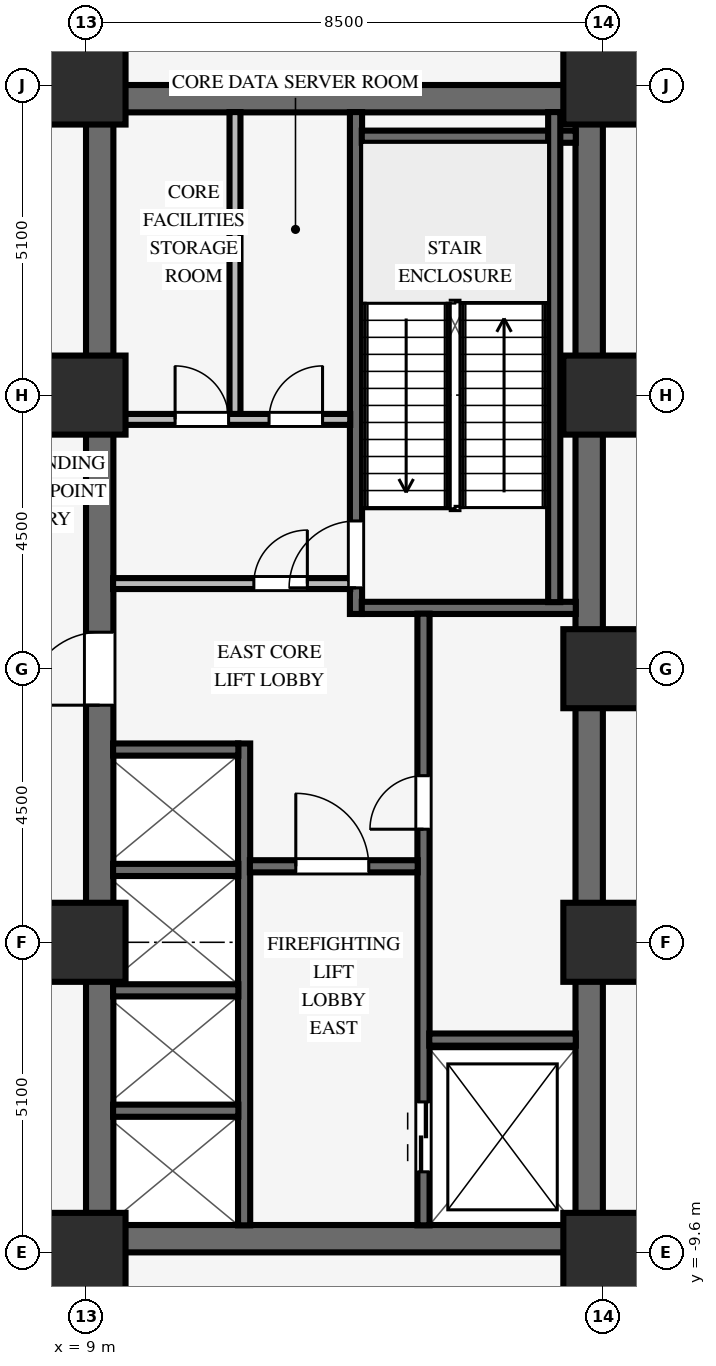
"""IFC4 building model, lengths in metres.
Left out: names, types, materials, properties, quantities, classifications, styles, units other than length and angle.
Written with IfcOpenShell. Run it as: python <this file> out.ifc"""

import sys

from ifc_helpers import new_model, si_unit, direction, frame, frame_2d, origin, origin_2d, place, context, subcontext, project, spatial, rectangle, extrude, source, transform, mapped, element, fill, save


model = new_model("IFC4")
c1 = context("Model", 3, precision=1e-05, world=origin(), true_north=direction((0.0, 1.0)))
c2 = subcontext(c1, "Body", "Model", "MODEL_VIEW")
j1 = project(units=[si_unit("LENGTHUNIT", "METRE"), si_unit("PLANEANGLEUNIT", "RADIAN")], contexts=[c1])
p1 = place(None, origin())
s1 = spatial("IfcSite", under=j1, at=p1, CompositionType="ELEMENT")
p2 = place(p1, origin())
s2 = spatial("IfcBuilding", under=s1, at=p2, CompositionType="ELEMENT")
p3 = place(p2, frame((0.0, 0.0, 18.4)))
s3 = spatial("IfcBuildingStorey", under=s2, at=p3, CompositionType="ELEMENT", Elevation=18.4)
for number, where, z_axis, x_axis in (
    (1, (9.0, -9.375, 0.0), (0.0, 0.0, 1.0), (1.0, 0.0, 0.0)),
    (2, (9.0, 9.375, 0.0), (0.0, 0.0, 1.0), (1.0, 0.0, 0.0)),
):
    element("IfcWall", number, at=place(p3, frame(where, z_axis=z_axis, x_axis=x_axis)), inside=s3, PredefinedType="SHEAR", context=c2, shape_type="SweptSolid", body=[
        extrude(rectangle(XDim=8.5, YDim=0.45, at=frame_2d((4.25, 0.0))), origin(), (0.0, 0.0, 1.0), 4.2),
    ])
p4 = place(p3, frame((9.225, -9.155, 0.0), z_axis=(0.0, 0.0, 1.0), x_axis=(0.0, 1.0, 0.0)))
e3 = element("IfcWall", 3, at=p4, inside=s3, PredefinedType="SHEAR", context=c2, shape_type="SweptSolid", body=[
    extrude(rectangle(XDim=18.31, YDim=0.45, at=frame_2d((9.155, 0.0))), origin(), (0.0, 0.0, 1.0), 4.2),
])
p5 = place(p4, frame((8.555, 0.0, 0.0)))
e4 = element("IfcOpeningElement", 4, at=p5, cuts=e3, PredefinedType="OPENING", context=c2, shape_type="SweptSolid", body=[
    extrude(rectangle(XDim=1.2, YDim=2.15, at=frame_2d((0.6, 1.075))), frame((0.0, 0.235, 0.0), z_axis=(0.0, -1.0, 0.0), x_axis=(1.0, 0.0, 0.0)), (0.0, 0.0, 1.0), 0.47),
])
p6 = place(p3, frame((17.275, -9.155, 0.0), z_axis=(0.0, 0.0, 1.0), x_axis=(0.0, 1.0, 0.0)))
e5 = element("IfcWall", 5, at=p6, inside=s3, PredefinedType="SHEAR", context=c2, shape_type="SweptSolid", body=[
    extrude(rectangle(XDim=18.31, YDim=0.45, at=frame_2d((9.155, 0.0))), origin(), (0.0, 0.0, 1.0), 4.2),
])
for number, where, z_axis, x_axis in (
    (6, (9.0, -9.6, 0.0), (0.0, 0.0, 1.0), (1.0, 0.0, 0.0)),
    (7, (9.0, -4.5, 0.0), (0.0, 0.0, 1.0), (1.0, 0.0, 0.0)),
    (8, (9.0, 4.5, 0.0), (0.0, 0.0, 1.0), (1.0, 0.0, 0.0)),
    (9, (9.0, 9.6, 0.0), (0.0, 0.0, 1.0), (1.0, 0.0, 0.0)),
    (10, (17.5, -9.6, 0.0), (0.0, 0.0, 1.0), (1.0, 0.0, 0.0)),
    (11, (17.5, -4.5, 0.0), (0.0, 0.0, 1.0), (1.0, 0.0, 0.0)),
    (12, (17.5, 4.5, 0.0), (0.0, 0.0, 1.0), (1.0, 0.0, 0.0)),
    (13, (17.5, 9.6, 0.0), (0.0, 0.0, 1.0), (1.0, 0.0, 0.0)),
    (14, (17.5, 0.0, 0.0), (0.0, 0.0, 1.0), (1.0, 0.0, 0.0)),
):
    element("IfcColumn", number, at=place(p3, frame(where, z_axis=z_axis, x_axis=x_axis)), inside=s3, PredefinedType="COLUMN", context=c2, shape_type="SweptSolid", body=[
        extrude(rectangle(XDim=1.3, YDim=1.3, at=origin_2d()), origin(), (0.0, 0.0, 1.0), 4.2),
    ])
p7 = place(p3, frame((13.44, 0.9, 0.0), z_axis=(0.0, 0.0, 1.0), x_axis=(0.0, 1.0, 0.0)))
e15 = element("IfcWall", 15, at=p7, inside=s3, PredefinedType="SHEAR", context=c2, shape_type="SweptSolid", body=[
    extrude(rectangle(XDim=8.255, YDim=0.2, at=frame_2d((4.127, 0.0))), origin(), (0.0, 0.0, 1.0), 4.2),
])
p8 = place(p7, frame((0.43, 0.0, 0.0)))
e16 = element("IfcOpeningElement", 16, at=p8, cuts=e15, PredefinedType="OPENING", context=c2, shape_type="SweptSolid", body=[
    extrude(rectangle(XDim=1.1, YDim=2.15, at=frame_2d((0.55, 1.075))), frame((0.0, 0.11, 0.0), z_axis=(0.0, -1.0, 0.0), x_axis=(1.0, 0.0, 0.0)), (0.0, 0.0, 1.0), 0.22),
])
for number, where, z_axis, x_axis in (
    (17, (13.535, 1.0, 0.0), (0.0, 0.0, 1.0), (1.0, 0.0, 0.0)),
    (18, (13.535, 8.75, 0.0), (0.0, 0.0, 1.0), (1.0, 0.0, 0.0)),
):
    element("IfcWall", number, at=place(p3, frame(where, z_axis=z_axis, x_axis=x_axis)), inside=s3, PredefinedType="SHEAR", context=c2, shape_type="SweptSolid", body=[
        extrude(rectangle(XDim=3.52, YDim=0.2, at=frame_2d((1.76, 0.0))), origin(), (0.0, 0.0, 1.0), 4.2),
    ])
p9 = place(p3, frame((16.7, 1.095, 0.0), z_axis=(0.0, 0.0, 1.0), x_axis=(0.0, 1.0, 0.0)))
e19 = element("IfcWall", 19, at=p9, inside=s3, PredefinedType="SHEAR", context=c2, shape_type="SweptSolid", body=[
    extrude(rectangle(XDim=8.06, YDim=0.2, at=frame_2d((4.03, 0.0))), origin(), (0.0, 0.0, 1.0), 4.2),
])
p10 = place(p3, frame((14.55, -9.155, 0.0), z_axis=(0.0, 0.0, 1.0), x_axis=(0.0, 1.0, 0.0)))
e20 = element("IfcWall", 20, at=p10, inside=s3, PredefinedType="SHEAR", context=c2, shape_type="SweptSolid", body=[
    extrude(rectangle(XDim=10.06, YDim=0.2, at=frame_2d((5.03, 0.0))), origin(), (0.0, 0.0, 1.0), 4.2),
])
p11 = place(p10, frame((6.515, 0.0, 0.0)))
e21 = element("IfcOpeningElement", 21, at=p11, cuts=e20, PredefinedType="OPENING", context=c2, shape_type="SweptSolid", body=[
    extrude(rectangle(XDim=0.88, YDim=2.1, at=frame_2d((0.44, 1.05))), frame((0.0, 0.11, 0.0), z_axis=(0.0, -1.0, 0.0), x_axis=(1.0, 0.0, 0.0)), (0.0, 0.0, 1.0), 0.22),
])
p12 = place(p10, frame((0.88, 0.0, 0.0)))
e22 = element("IfcOpeningElement", 22, at=p12, cuts=e20, PredefinedType="OPENING", context=c2, shape_type="SweptSolid", body=[
    extrude(rectangle(XDim=1.15, YDim=2.15, at=frame_2d((0.575, 1.075))), frame((0.0, 0.11, 0.0), z_axis=(0.0, -1.0, 0.0), x_axis=(1.0, 0.0, 0.0)), (0.0, 0.0, 1.0), 0.22),
])
p13 = place(p3, frame((14.645, -6.1, 0.0), z_axis=(0.0, 0.0, 1.0), x_axis=(1.0, 0.0, 0.0)))
e23 = element("IfcWall", 23, at=p13, inside=s3, PredefinedType="SHEAR", context=c2, shape_type="SweptSolid", body=[
    extrude(rectangle(XDim=2.41, YDim=0.2, at=frame_2d((1.205, 0.0))), origin(), (0.0, 0.0, 1.0), 4.2),
])
p14 = place(p3, frame((11.6, -9.155, 0.0), z_axis=(0.0, 0.0, 1.0), x_axis=(0.0, 1.0, 0.0)))
e24 = element("IfcWall", 24, at=p14, inside=s3, PredefinedType="SHEAR", context=c2, shape_type="SweptSolid", body=[
    extrude(rectangle(XDim=7.925, YDim=0.2, at=frame_2d((3.962, 0.0))), origin(), (0.0, 0.0, 1.0), 4.2),
])
p15 = place(p3, frame((11.695, -3.25, 0.0), z_axis=(0.0, 0.0, 1.0), x_axis=(1.0, 0.0, 0.0)))
e25 = element("IfcWall", 25, at=p15, inside=s3, PredefinedType="SHEAR", context=c2, shape_type="SweptSolid", body=[
    extrude(rectangle(XDim=2.76, YDim=0.2, at=frame_2d((1.38, 0.0))), origin(), (0.0, 0.0, 1.0), 4.2),
])
p16 = place(p15, frame((0.755, 0.0, 0.0)))
e26 = element("IfcOpeningElement", 26, at=p16, cuts=e25, PredefinedType="OPENING", context=c2, shape_type="SweptSolid", body=[
    extrude(rectangle(XDim=1.2, YDim=2.15, at=frame_2d((0.6, 1.075))), frame((0.0, 0.11, 0.0), z_axis=(0.0, -1.0, 0.0), x_axis=(1.0, 0.0, 0.0)), (0.0, 0.0, 1.0), 0.22),
])
for number, where, z_axis, x_axis in (
    (27, (9.445, -7.27, 0.0), (0.0, 0.0, 1.0), (1.0, 0.0, 0.0)),
    (28, (9.445, -5.29, 0.0), (0.0, 0.0, 1.0), (1.0, 0.0, 0.0)),
    (29, (9.445, -3.31, 0.0), (0.0, 0.0, 1.0), (1.0, 0.0, 0.0)),
    (30, (9.445, -1.33, 0.0), (0.0, 0.0, 1.0), (1.0, 0.0, 0.0)),
):
    element("IfcWall", number, at=place(p3, frame(where, z_axis=z_axis, x_axis=x_axis)), inside=s3, PredefinedType="SHEAR", context=c2, shape_type="SweptSolid", body=[
        extrude(rectangle(XDim=2.06, YDim=0.2, at=frame_2d((1.03, 0.0))), origin(), (0.0, 0.0, 1.0), 4.2),
    ])
p17 = place(p3, frame((9.445, 1.4, 0.0), z_axis=(0.0, 0.0, 1.0), x_axis=(1.0, 0.0, 0.0)))
e31 = element("IfcWall", 31, at=p17, inside=s3, PredefinedType="PARTITIONING", context=c2, shape_type="SweptSolid", body=[
    extrude(rectangle(XDim=3.9, YDim=0.18, at=frame_2d((1.95, 0.0))), origin(), (0.0, 0.0, 1.0), 4.19),
])
p18 = place(p17, frame((2.315, 0.0, 0.0)))
e32 = element("IfcOpeningElement", 32, at=p18, cuts=e31, PredefinedType="OPENING", context=c2, shape_type="SweptSolid", body=[
    extrude(rectangle(XDim=0.88, YDim=2.1, at=frame_2d((0.44, 1.05))), frame((0.0, 0.1, 0.0), z_axis=(0.0, -1.0, 0.0), x_axis=(1.0, 0.0, 0.0)), (0.0, 0.0, 1.0), 0.2),
])
p19 = place(p3, frame((9.445, 4.1, 0.0), z_axis=(0.0, 0.0, 1.0), x_axis=(1.0, 0.0, 0.0)))
e33 = element("IfcWall", 33, at=p19, inside=s3, PredefinedType="PARTITIONING", context=c2, shape_type="SweptSolid", body=[
    extrude(rectangle(XDim=3.9, YDim=0.18, at=frame_2d((1.95, 0.0))), origin(), (0.0, 0.0, 1.0), 4.19),
])
p20 = place(p19, frame((1.02, 0.0, 0.0)))
e34 = element("IfcOpeningElement", 34, at=p20, cuts=e33, PredefinedType="OPENING", context=c2, shape_type="SweptSolid", body=[
    extrude(rectangle(XDim=0.88, YDim=2.1, at=frame_2d((0.44, 1.05))), frame((0.0, 0.1, 0.0), z_axis=(0.0, -1.0, 0.0), x_axis=(1.0, 0.0, 0.0)), (0.0, 0.0, 1.0), 0.2),
])
p21 = place(p19, frame((2.565, 0.0, 0.0)))
e35 = element("IfcOpeningElement", 35, at=p21, cuts=e33, PredefinedType="OPENING", context=c2, shape_type="SweptSolid", body=[
    extrude(rectangle(XDim=0.88, YDim=2.1, at=frame_2d((0.44, 1.05))), frame((0.0, 0.1, 0.0), z_axis=(0.0, -1.0, 0.0), x_axis=(1.0, 0.0, 0.0)), (0.0, 0.0, 1.0), 0.2),
])
p22 = place(p3, frame((11.45, 4.19, 0.0), z_axis=(0.0, 0.0, 1.0), x_axis=(0.0, 1.0, 0.0)))
e36 = element("IfcWall", 36, at=p22, inside=s3, PredefinedType="PARTITIONING", context=c2, shape_type="SweptSolid", body=[
    extrude(rectangle(XDim=4.965, YDim=0.18, at=frame_2d((2.482, 0.0))), origin(), (0.0, 0.0, 1.0), 4.19),
])
m1 = source(origin(), c2, "Body", "SweptSolid", [
    extrude(rectangle(XDim=1.1, YDim=2.15, at=frame_2d((0.55, 1.075))), frame((0.0, 0.025, 0.0), z_axis=(0.0, -1.0, 0.0), x_axis=(1.0, 0.0, 0.0)), (0.0, 0.0, 1.0), 0.05),
])
p23 = place(p8, origin())
e37 = element("IfcDoor", 37, at=p23, inside=s3, OperationType="SINGLE_SWING_LEFT", PredefinedType="DOOR", context=c2, shape_type="MappedRepresentation", body=[
    mapped(m1, transform((0.0, 0.0, 0.0), scale=1.0)),
])
fill(e16, e37)
m2 = source(origin(), c2, "Body", "SweptSolid", [
    extrude(rectangle(XDim=0.88, YDim=2.1, at=frame_2d((0.44, 1.05))), frame((0.0, 0.025, 0.0), z_axis=(0.0, -1.0, 0.0), x_axis=(1.0, 0.0, 0.0)), (0.0, 0.0, 1.0), 0.05),
])
p24 = place(p11, origin())
e38 = element("IfcDoor", 38, at=p24, inside=s3, OperationType="SINGLE_SWING_LEFT", PredefinedType="DOOR", context=c2, shape_type="MappedRepresentation", body=[
    mapped(m2, transform((0.0, 0.0, 0.0), scale=1.0)),
])
fill(e21, e38)
m3 = source(origin(), c2, "Body", "SweptSolid", [
    extrude(rectangle(XDim=1.2, YDim=2.15, at=frame_2d((0.6, 1.075))), frame((0.0, 0.025, 0.0), z_axis=(0.0, -1.0, 0.0), x_axis=(1.0, 0.0, 0.0)), (0.0, 0.0, 1.0), 0.05),
])
p25 = place(p16, origin())
e39 = element("IfcDoor", 39, at=p25, inside=s3, OperationType="SINGLE_SWING_LEFT", PredefinedType="DOOR", context=c2, shape_type="MappedRepresentation", body=[
    mapped(m3, transform((0.0, 0.0, 0.0), scale=1.0)),
])
fill(e26, e39)
p26 = place(p5, origin())
e40 = element("IfcDoor", 40, at=p26, inside=s3, OperationType="SINGLE_SWING_LEFT", PredefinedType="DOOR", context=c2, shape_type="MappedRepresentation", body=[
    mapped(m3, transform((0.0, 0.0, 0.0), scale=1.0)),
])
fill(e4, e40)
p27 = place(p18, origin())
e41 = element("IfcDoor", 41, at=p27, inside=s3, OperationType="SINGLE_SWING_RIGHT", PredefinedType="DOOR", context=c2, shape_type="MappedRepresentation", body=[
    mapped(m2, transform((0.0, 0.0, 0.0), scale=1.0)),
])
fill(e32, e41)
p28 = place(p20, origin())
e42 = element("IfcDoor", 42, at=p28, inside=s3, OperationType="SINGLE_SWING_LEFT", PredefinedType="DOOR", context=c2, shape_type="MappedRepresentation", body=[
    mapped(m2, transform((0.0, 0.0, 0.0), scale=1.0)),
])
fill(e34, e42)
p29 = place(p21, origin())
e43 = element("IfcDoor", 43, at=p29, inside=s3, OperationType="SINGLE_SWING_RIGHT", PredefinedType="DOOR", context=c2, shape_type="MappedRepresentation", body=[
    mapped(m2, transform((0.0, 0.0, 0.0), scale=1.0)),
])
fill(e35, e43)
m4 = source(origin(), c2, "Body", "SweptSolid", [
    extrude(rectangle(XDim=1.15, YDim=2.15, at=frame_2d((0.575, 1.075))), frame((0.0, 0.025, 0.0), z_axis=(0.0, -1.0, 0.0), x_axis=(1.0, 0.0, 0.0)), (0.0, 0.0, 1.0), 0.05),
])
p30 = place(p12, origin())
e44 = element("IfcDoor", 44, at=p30, inside=s3, OperationType="DOUBLE_DOOR_SLIDING", PredefinedType="DOOR", context=c2, shape_type="MappedRepresentation", body=[
    mapped(m4, transform((0.0, 0.0, 0.0), scale=1.0)),
])
fill(e22, e44)
save(model, sys.argv[1])
